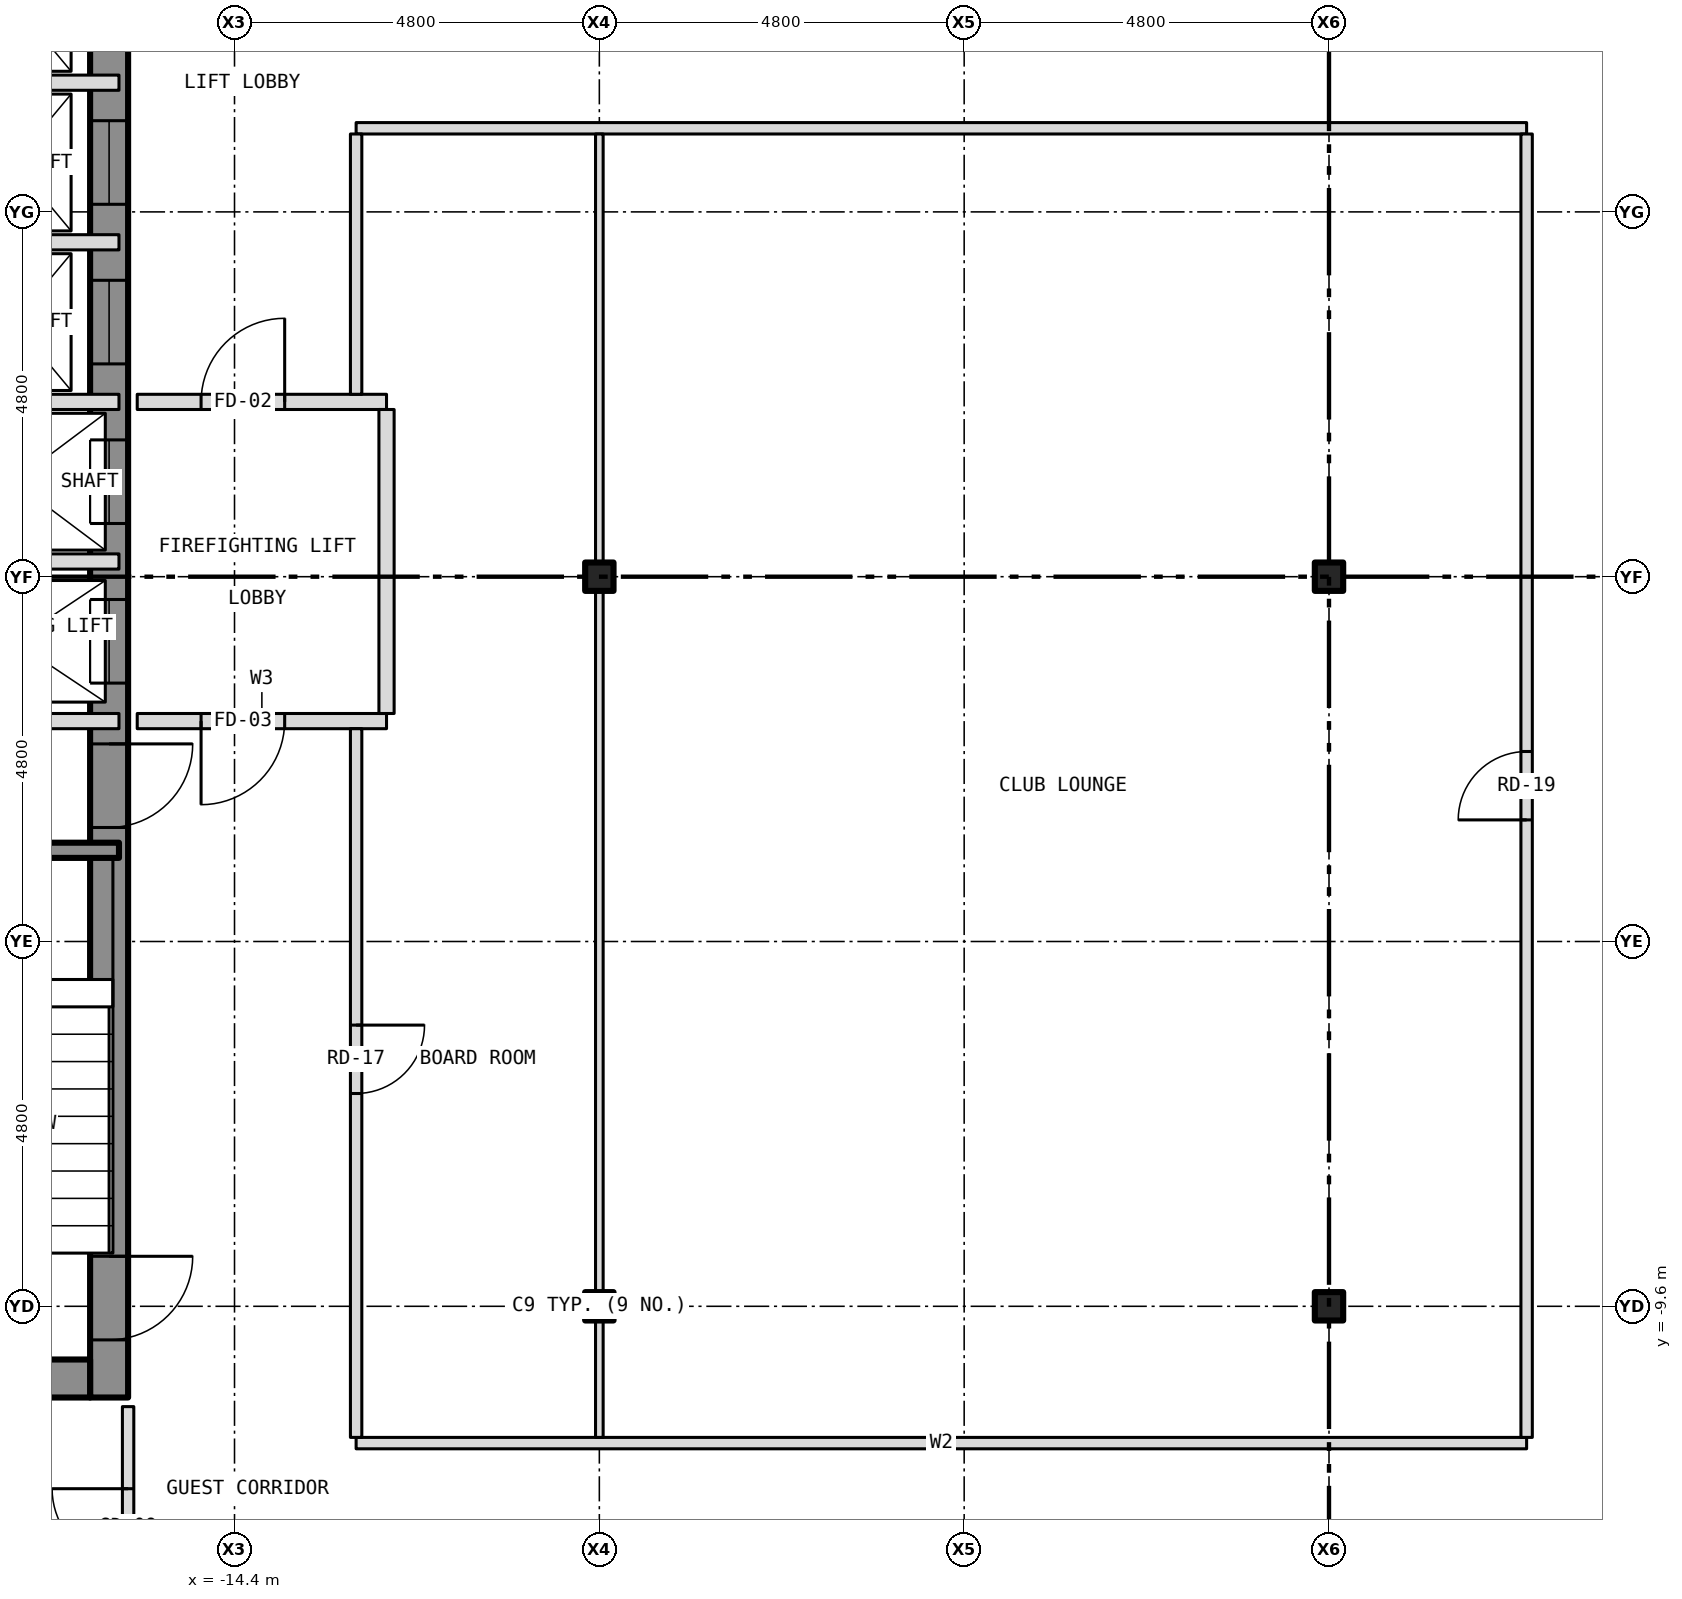
"""IFC4 building model, lengths in metres.
Left out: names, types, materials, properties, quantities, classifications, styles, units other than length and angle.
Written with IfcOpenShell. Run it as: python <this file> out.ifc"""

import sys

from ifc_helpers import new_model, si_unit, direction, frame, frame_2d, origin, origin_2d, place, context, subcontext, project, spatial, rectangle, i_section, extrude, element, fill, save


model = new_model("IFC4")
c1 = context("Model", 3, precision=1e-05, world=origin(), true_north=direction((0.0, 1.0)))
c2 = subcontext(c1, "Body", "Model", "MODEL_VIEW")
j1 = project(units=[si_unit("LENGTHUNIT", "METRE"), si_unit("PLANEANGLEUNIT", "RADIAN")], contexts=[c1])
p1 = place(None, origin())
s1 = spatial("IfcSite", under=j1, at=p1, CompositionType="ELEMENT")
p2 = place(p1, origin())
s2 = spatial("IfcBuilding", under=s1, at=p2, CompositionType="ELEMENT")
p3 = place(p2, frame((0.0, 0.0, 158.5)))
s3 = spatial("IfcBuildingStorey", under=s2, at=p3, CompositionType="ELEMENT", Elevation=158.5)
for number, where, z_axis, x_axis in (
    (1, (-9.6, -9.6, -0.15), (0.0, 0.0, 1.0), (1.0, 0.0, 0.0)),
    (2, (-9.6, 0.0, -0.15), (0.0, 0.0, 1.0), (1.0, 0.0, 0.0)),
    (3, (0.0, -9.6, -0.15), (0.0, 0.0, 1.0), (1.0, 0.0, 0.0)),
    (4, (0.0, 0.0, -0.15), (0.0, 0.0, 1.0), (1.0, 0.0, 0.0)),
):
    element("IfcColumn", number, at=place(p3, frame(where, z_axis=z_axis, x_axis=x_axis)), inside=s3, PredefinedType="COLUMN", context=c2, shape_type="SweptSolid", body=[
        extrude(i_section(OverallWidth=0.373, OverallDepth=0.373, WebThickness=0.016, FlangeThickness=0.026, at=origin_2d()), origin(), (0.0, 0.0, 1.0), 3.5),
    ])
p4 = place(p3, frame((-16.05, -10.8, 0.0), z_axis=(0.0, 0.0, 1.0), x_axis=(0.0, 1.0, 0.0)))
e5 = element("IfcWall", 5, at=p4, inside=s3, PredefinedType="SHEAR", context=c2, shape_type="SweptSolid", body=[
    extrude(rectangle(XDim=21.6, YDim=0.5, at=frame_2d((10.8, 0.0))), origin(), (0.0, 0.0, 1.0), 3.25),
])
p5 = place(p4, frame((9.4, 0.0, 0.0)))
e6 = element("IfcOpeningElement", 6, at=p5, cuts=e5, PredefinedType="OPENING", context=c2, shape_type="SweptSolid", body=[
    extrude(rectangle(XDim=1.1, YDim=2.1, at=frame_2d((0.55, 1.05))), frame((0.0, 0.262, 0.0), z_axis=(0.0, -1.0, 0.0), x_axis=(1.0, 0.0, 0.0)), (0.0, 0.0, 1.0), 0.524),
])
p6 = place(p4, frame((11.5, 0.0, 0.0)))
e7 = element("IfcOpeningElement", 7, at=p6, cuts=e5, PredefinedType="OPENING", context=c2, shape_type="SweptSolid", body=[
    extrude(rectangle(XDim=1.1, YDim=2.1, at=frame_2d((0.55, 1.05))), frame((0.0, 0.262, 0.0), z_axis=(0.0, -1.0, 0.0), x_axis=(1.0, 0.0, 0.0)), (0.0, 0.0, 1.0), 0.524),
])
p7 = place(p4, frame((13.6, 0.0, 0.0)))
e8 = element("IfcOpeningElement", 8, at=p7, cuts=e5, PredefinedType="OPENING", context=c2, shape_type="SweptSolid", body=[
    extrude(rectangle(XDim=1.1, YDim=2.1, at=frame_2d((0.55, 1.05))), frame((0.0, 0.262, 0.0), z_axis=(0.0, -1.0, 0.0), x_axis=(1.0, 0.0, 0.0)), (0.0, 0.0, 1.0), 0.524),
])
p8 = place(p4, frame((15.7, 0.0, 0.0)))
e9 = element("IfcOpeningElement", 9, at=p8, cuts=e5, PredefinedType="OPENING", context=c2, shape_type="SweptSolid", body=[
    extrude(rectangle(XDim=1.1, YDim=2.1, at=frame_2d((0.55, 1.05))), frame((0.0, 0.262, 0.0), z_axis=(0.0, -1.0, 0.0), x_axis=(1.0, 0.0, 0.0)), (0.0, 0.0, 1.0), 0.524),
])
p9 = place(p4, frame((17.8, 0.0, 0.0)))
e10 = element("IfcOpeningElement", 10, at=p9, cuts=e5, PredefinedType="OPENING", context=c2, shape_type="SweptSolid", body=[
    extrude(rectangle(XDim=1.1, YDim=2.1, at=frame_2d((0.55, 1.05))), frame((0.0, 0.262, 0.0), z_axis=(0.0, -1.0, 0.0), x_axis=(1.0, 0.0, 0.0)), (0.0, 0.0, 1.0), 0.524),
])
p10 = place(p4, frame((0.758, 0.0, 0.0)))
e11 = element("IfcOpeningElement", 11, at=p10, cuts=e5, PredefinedType="OPENING", context=c2, shape_type="SweptSolid", body=[
    extrude(rectangle(XDim=1.1, YDim=2.1, at=frame_2d((0.55, 1.05))), frame((0.0, 0.262, 0.0), z_axis=(0.0, -1.0, 0.0), x_axis=(1.0, 0.0, 0.0)), (0.0, 0.0, 1.0), 0.524),
])
p11 = place(p4, frame((7.5, 0.0, 0.0)))
e12 = element("IfcOpeningElement", 12, at=p11, cuts=e5, PredefinedType="OPENING", context=c2, shape_type="SweptSolid", body=[
    extrude(rectangle(XDim=1.1, YDim=2.1, at=frame_2d((0.55, 1.05))), frame((0.0, 0.262, 0.0), z_axis=(0.0, -1.0, 0.0), x_axis=(1.0, 0.0, 0.0)), (0.0, 0.0, 1.0), 0.524),
])
p12 = place(p4, frame((20.0, 0.0, 0.0)))
e13 = element("IfcOpeningElement", 13, at=p12, cuts=e5, PredefinedType="OPENING", context=c2, shape_type="SweptSolid", body=[
    extrude(rectangle(XDim=0.9, YDim=2.1, at=frame_2d((0.45, 1.05))), frame((0.0, 0.262, 0.0), z_axis=(0.0, -1.0, 0.0), x_axis=(1.0, 0.0, 0.0)), (0.0, 0.0, 1.0), 0.524),
])
p13 = place(p3, frame((-21.1, -10.55, 0.0), z_axis=(0.0, 0.0, 1.0), x_axis=(1.0, 0.0, 0.0)))
e14 = element("IfcWall", 14, at=p13, inside=s3, PredefinedType="SHEAR", context=c2, shape_type="SweptSolid", body=[
    extrude(rectangle(XDim=4.8, YDim=0.5, at=frame_2d((2.4, 0.0))), origin(), (0.0, 0.0, 1.0), 3.25),
])
p14 = place(p3, frame((-12.8, -11.4, 0.0), z_axis=(0.0, 0.0, 1.0), x_axis=(1.0, 0.0, 0.0)))
e15 = element("IfcWall", 15, at=p14, inside=s3, PredefinedType="PARTITIONING", context=c2, shape_type="SweptSolid", body=[
    extrude(rectangle(XDim=15.4, YDim=0.15, at=frame_2d((7.7, 0.0))), origin(), (0.0, 0.0, 1.0), 3.35),
])
p15 = place(p3, frame((-20.0, -3.6, 0.0), z_axis=(0.0, 0.0, 1.0), x_axis=(1.0, 0.0, 0.0)))
e16 = element("IfcWall", 16, at=p15, inside=s3, PredefinedType="SHEAR", context=c2, shape_type="SweptSolid", body=[
    extrude(rectangle(XDim=4.08, YDim=0.2, at=frame_2d((2.04, 0.0))), origin(), (0.0, 0.0, 1.0), 3.25),
])
p16 = place(p3, frame((-21.48, -1.9, 0.0), z_axis=(0.0, 0.0, 1.0), x_axis=(1.0, 0.0, 0.0)))
e17 = element("IfcWall", 17, at=p16, inside=s3, PredefinedType="PARTITIONING", context=c2, shape_type="SweptSolid", body=[
    extrude(rectangle(XDim=5.56, YDim=0.2, at=frame_2d((2.78, 0.0))), origin(), (0.0, 0.0, 1.0), 3.25),
])
p17 = place(p16, frame((0.83, 0.0, 0.0)))
e18 = element("IfcOpeningElement", 18, at=p17, cuts=e17, PredefinedType="OPENING", context=c2, shape_type="SweptSolid", body=[
    extrude(rectangle(XDim=0.9, YDim=2.1, at=frame_2d((0.45, 1.05))), frame((0.0, 0.112, 0.0), z_axis=(0.0, -1.0, 0.0), x_axis=(1.0, 0.0, 0.0)), (0.0, 0.0, 1.0), 0.224),
])
p18 = place(p3, frame((-15.68, -1.9, 0.0), z_axis=(0.0, 0.0, 1.0), x_axis=(1.0, 0.0, 0.0)))
e19 = element("IfcWall", 19, at=p18, inside=s3, PredefinedType="PARTITIONING", context=c2, shape_type="SweptSolid", body=[
    extrude(rectangle(XDim=3.28, YDim=0.2, at=frame_2d((1.64, 0.0))), origin(), (0.0, 0.0, 1.0), 3.35),
])
p19 = place(p18, frame((0.84, 0.0, 0.0)))
e20 = element("IfcOpeningElement", 20, at=p19, cuts=e19, PredefinedType="OPENING", context=c2, shape_type="SweptSolid", body=[
    extrude(rectangle(XDim=1.1, YDim=2.1, at=frame_2d((0.55, 1.05))), frame((0.0, 0.112, 0.0), z_axis=(0.0, -1.0, 0.0), x_axis=(1.0, 0.0, 0.0)), (0.0, 0.0, 1.0), 0.224),
])
for number, where, z_axis, x_axis in (
    (21, (-18.8, 0.2, 0.0), (0.0, 0.0, 1.0), (1.0, 0.0, 0.0)),
    (22, (-18.8, 2.3, 0.0), (0.0, 0.0, 1.0), (1.0, 0.0, 0.0)),
):
    element("IfcWall", number, at=place(p3, frame(where, z_axis=z_axis, x_axis=x_axis)), inside=s3, PredefinedType="PARTITIONING", context=c2, shape_type="SweptSolid", body=[
        extrude(rectangle(XDim=2.88, YDim=0.2, at=frame_2d((1.44, 0.0))), origin(), (0.0, 0.0, 1.0), 3.25),
    ])
p20 = place(p3, frame((-15.68, 2.3, 0.0), z_axis=(0.0, 0.0, 1.0), x_axis=(1.0, 0.0, 0.0)))
e23 = element("IfcWall", 23, at=p20, inside=s3, PredefinedType="PARTITIONING", context=c2, shape_type="SweptSolid", body=[
    extrude(rectangle(XDim=3.28, YDim=0.2, at=frame_2d((1.64, 0.0))), origin(), (0.0, 0.0, 1.0), 3.35),
])
p21 = place(p20, frame((0.84, 0.0, 0.0)))
e24 = element("IfcOpeningElement", 24, at=p21, cuts=e23, PredefinedType="OPENING", context=c2, shape_type="SweptSolid", body=[
    extrude(rectangle(XDim=1.1, YDim=2.1, at=frame_2d((0.55, 1.05))), frame((0.0, 0.112, 0.0), z_axis=(0.0, -1.0, 0.0), x_axis=(1.0, 0.0, 0.0)), (0.0, 0.0, 1.0), 0.224),
])
p22 = place(p3, frame((-18.8, 4.4, 0.0), z_axis=(0.0, 0.0, 1.0), x_axis=(1.0, 0.0, 0.0)))
e25 = element("IfcWall", 25, at=p22, inside=s3, PredefinedType="PARTITIONING", context=c2, shape_type="SweptSolid", body=[
    extrude(rectangle(XDim=2.88, YDim=0.2, at=frame_2d((1.44, 0.0))), origin(), (0.0, 0.0, 1.0), 3.25),
])
p23 = place(p3, frame((-12.8, 5.9, 0.0), z_axis=(0.0, 0.0, 1.0), x_axis=(1.0, 0.0, 0.0)))
e26 = element("IfcWall", 26, at=p23, inside=s3, PredefinedType="PARTITIONING", context=c2, shape_type="SweptSolid", body=[
    extrude(rectangle(XDim=15.4, YDim=0.15, at=frame_2d((7.7, 0.0))), origin(), (0.0, 0.0, 1.0), 3.35),
])
p24 = place(p3, frame((-18.8, 6.5, 0.0), z_axis=(0.0, 0.0, 1.0), x_axis=(1.0, 0.0, 0.0)))
e27 = element("IfcWall", 27, at=p24, inside=s3, PredefinedType="PARTITIONING", context=c2, shape_type="SweptSolid", body=[
    extrude(rectangle(XDim=2.88, YDim=0.2, at=frame_2d((1.44, 0.0))), origin(), (0.0, 0.0, 1.0), 3.25),
])
p25 = place(p3, frame((-15.8, -13.525, 0.0), z_axis=(0.0, 0.0, 1.0), x_axis=(0.0, 1.0, 0.0)))
e28 = element("IfcWall", 28, at=p25, inside=s3, PredefinedType="PARTITIONING", context=c2, shape_type="SweptSolid", body=[
    extrude(rectangle(XDim=2.605, YDim=0.15, at=frame_2d((1.302, 0.0))), origin(), (0.0, 0.0, 1.0), 3.35),
])
p26 = place(p25, frame((0.525, 0.0, 0.0)))
e29 = element("IfcOpeningElement", 29, at=p26, cuts=e28, PredefinedType="OPENING", context=c2, shape_type="SweptSolid", body=[
    extrude(rectangle(XDim=1.0, YDim=2.1, at=frame_2d((0.5, 1.05))), frame((0.0, 0.087, 0.0), z_axis=(0.0, -1.0, 0.0), x_axis=(1.0, 0.0, 0.0)), (0.0, 0.0, 1.0), 0.174),
])
p27 = place(p3, frame((-12.8, -11.325, 0.0), z_axis=(0.0, 0.0, 1.0), x_axis=(0.0, 1.0, 0.0)))
e30 = element("IfcWall", 30, at=p27, inside=s3, PredefinedType="PARTITIONING", context=c2, shape_type="SweptSolid", body=[
    extrude(rectangle(XDim=9.325, YDim=0.15, at=frame_2d((4.663, 0.0))), origin(), (0.0, 0.0, 1.0), 3.35),
])
p28 = place(p27, frame((4.525, 0.0, 0.0)))
e31 = element("IfcOpeningElement", 31, at=p28, cuts=e30, PredefinedType="OPENING", context=c2, shape_type="SweptSolid", body=[
    extrude(rectangle(XDim=0.9, YDim=2.1, at=frame_2d((0.45, 1.05))), frame((0.0, 0.087, 0.0), z_axis=(0.0, -1.0, 0.0), x_axis=(1.0, 0.0, 0.0)), (0.0, 0.0, 1.0), 0.174),
])
p29 = place(p3, frame((-12.8, 2.4, 0.0), z_axis=(0.0, 0.0, 1.0), x_axis=(0.0, 1.0, 0.0)))
e32 = element("IfcWall", 32, at=p29, inside=s3, PredefinedType="PARTITIONING", context=c2, shape_type="SweptSolid", body=[
    extrude(rectangle(XDim=3.425, YDim=0.15, at=frame_2d((1.712, 0.0))), origin(), (0.0, 0.0, 1.0), 3.35),
])
p30 = place(p3, frame((-12.4, -1.8, 0.0), z_axis=(0.0, 0.0, 1.0), x_axis=(0.0, 1.0, 0.0)))
e33 = element("IfcWall", 33, at=p30, inside=s3, PredefinedType="PARTITIONING", context=c2, shape_type="SweptSolid", body=[
    extrude(rectangle(XDim=4.0, YDim=0.2, at=frame_2d((2.0, 0.0))), origin(), (0.0, 0.0, 1.0), 3.35),
])
p31 = place(p3, frame((-9.6, -11.325, 0.0), z_axis=(0.0, 0.0, 1.0), x_axis=(0.0, 1.0, 0.0)))
e34 = element("IfcWall", 34, at=p31, inside=s3, PredefinedType="PARTITIONING", context=c2, shape_type="SweptSolid", body=[
    extrude(rectangle(XDim=1.538, YDim=0.1, at=frame_2d((0.769, 0.0))), origin(), (0.0, 0.0, 1.0), 2.728),
])
p32 = place(p3, frame((-9.6, -9.787, 0.0), z_axis=(0.0, 0.0, 1.0), x_axis=(0.0, 1.0, 0.0)))
e35 = element("IfcWall", 35, at=p32, inside=s3, PredefinedType="PARTITIONING", context=c2, shape_type="SweptSolid", body=[
    extrude(rectangle(XDim=0.374, YDim=0.1, at=frame_2d((0.187, 0.0))), origin(), (0.0, 0.0, 1.0), 3.35),
])
p33 = place(p3, frame((-9.6, -9.413, 0.0), z_axis=(0.0, 0.0, 1.0), x_axis=(0.0, 1.0, 0.0)))
e36 = element("IfcWall", 36, at=p33, inside=s3, PredefinedType="PARTITIONING", context=c2, shape_type="SweptSolid", body=[
    extrude(rectangle(XDim=9.226, YDim=0.1, at=frame_2d((4.613, 0.0))), origin(), (0.0, 0.0, 1.0), 2.728),
])
p34 = place(p3, frame((-9.6, -0.187, 0.0), z_axis=(0.0, 0.0, 1.0), x_axis=(0.0, 1.0, 0.0)))
e37 = element("IfcWall", 37, at=p34, inside=s3, PredefinedType="PARTITIONING", context=c2, shape_type="SweptSolid", body=[
    extrude(rectangle(XDim=0.374, YDim=0.1, at=frame_2d((0.187, 0.0))), origin(), (0.0, 0.0, 1.0), 3.35),
])
p35 = place(p3, frame((-9.6, 0.187, 0.0), z_axis=(0.0, 0.0, 1.0), x_axis=(0.0, 1.0, 0.0)))
e38 = element("IfcWall", 38, at=p35, inside=s3, PredefinedType="PARTITIONING", context=c2, shape_type="SweptSolid", body=[
    extrude(rectangle(XDim=5.638, YDim=0.1, at=frame_2d((2.819, 0.0))), origin(), (0.0, 0.0, 1.0), 2.728),
])
p36 = place(p3, frame((2.6, -11.325, 0.0), z_axis=(0.0, 0.0, 1.0), x_axis=(0.0, 1.0, 0.0)))
e39 = element("IfcWall", 39, at=p36, inside=s3, PredefinedType="PARTITIONING", context=c2, shape_type="SweptSolid", body=[
    extrude(rectangle(XDim=17.15, YDim=0.15, at=frame_2d((8.575, 0.0))), origin(), (0.0, 0.0, 1.0), 3.35),
])
p37 = place(p36, frame((8.125, 0.0, 0.0)))
e40 = element("IfcOpeningElement", 40, at=p37, cuts=e39, PredefinedType="OPENING", context=c2, shape_type="SweptSolid", body=[
    extrude(rectangle(XDim=0.9, YDim=2.1, at=frame_2d((0.45, 1.05))), frame((0.0, 0.087, 0.0), z_axis=(0.0, -1.0, 0.0), x_axis=(1.0, 0.0, 0.0)), (0.0, 0.0, 1.0), 0.174),
])
p38 = place(p5, origin())
e41 = element("IfcDoor", 41, at=p38, inside=s3, OperationType="SLIDING_TO_LEFT", PredefinedType="DOOR", context=c2, shape_type="SweptSolid", body=[
    extrude(rectangle(XDim=1.1, YDim=2.1, at=frame_2d((0.55, 1.05))), frame((0.0, 0.025, 0.0), z_axis=(0.0, -1.0, 0.0), x_axis=(1.0, 0.0, 0.0)), (0.0, 0.0, 1.0), 0.05),
])
fill(e6, e41)
p39 = place(p6, origin())
e42 = element("IfcDoor", 42, at=p39, inside=s3, OperationType="SLIDING_TO_LEFT", PredefinedType="DOOR", context=c2, shape_type="SweptSolid", body=[
    extrude(rectangle(XDim=1.1, YDim=2.1, at=frame_2d((0.55, 1.05))), frame((0.0, 0.025, 0.0), z_axis=(0.0, -1.0, 0.0), x_axis=(1.0, 0.0, 0.0)), (0.0, 0.0, 1.0), 0.05),
])
fill(e7, e42)
p40 = place(p7, origin())
e43 = element("IfcDoor", 43, at=p40, inside=s3, OperationType="SLIDING_TO_LEFT", PredefinedType="DOOR", context=c2, shape_type="SweptSolid", body=[
    extrude(rectangle(XDim=1.1, YDim=2.1, at=frame_2d((0.55, 1.05))), frame((0.0, 0.025, 0.0), z_axis=(0.0, -1.0, 0.0), x_axis=(1.0, 0.0, 0.0)), (0.0, 0.0, 1.0), 0.05),
])
fill(e8, e43)
p41 = place(p8, origin())
e44 = element("IfcDoor", 44, at=p41, inside=s3, OperationType="SLIDING_TO_LEFT", PredefinedType="DOOR", context=c2, shape_type="SweptSolid", body=[
    extrude(rectangle(XDim=1.1, YDim=2.1, at=frame_2d((0.55, 1.05))), frame((0.0, 0.025, 0.0), z_axis=(0.0, -1.0, 0.0), x_axis=(1.0, 0.0, 0.0)), (0.0, 0.0, 1.0), 0.05),
])
fill(e9, e44)
p42 = place(p10, origin())
e45 = element("IfcDoor", 45, at=p42, inside=s3, OperationType="SINGLE_SWING_RIGHT", PredefinedType="DOOR", context=c2, shape_type="SweptSolid", body=[
    extrude(rectangle(XDim=1.1, YDim=2.1, at=frame_2d((0.55, 1.05))), frame((0.0, 0.025, 0.0), z_axis=(0.0, -1.0, 0.0), x_axis=(1.0, 0.0, 0.0)), (0.0, 0.0, 1.0), 0.05),
])
fill(e11, e45)
p43 = place(p11, origin())
e46 = element("IfcDoor", 46, at=p43, inside=s3, OperationType="SINGLE_SWING_RIGHT", PredefinedType="DOOR", context=c2, shape_type="SweptSolid", body=[
    extrude(rectangle(XDim=1.1, YDim=2.1, at=frame_2d((0.55, 1.05))), frame((0.0, 0.025, 0.0), z_axis=(0.0, -1.0, 0.0), x_axis=(1.0, 0.0, 0.0)), (0.0, 0.0, 1.0), 0.05),
])
fill(e12, e46)
p44 = place(p21, origin())
e47 = element("IfcDoor", 47, at=p44, inside=s3, OperationType="SINGLE_SWING_RIGHT", PredefinedType="DOOR", context=c2, shape_type="SweptSolid", body=[
    extrude(rectangle(XDim=1.1, YDim=2.1, at=frame_2d((0.55, 1.05))), frame((0.0, 0.025, 0.0), z_axis=(0.0, -1.0, 0.0), x_axis=(1.0, 0.0, 0.0)), (0.0, 0.0, 1.0), 0.05),
])
fill(e24, e47)
p45 = place(p19, origin())
e48 = element("IfcDoor", 48, at=p45, inside=s3, OperationType="SINGLE_SWING_LEFT", PredefinedType="DOOR", context=c2, shape_type="SweptSolid", body=[
    extrude(rectangle(XDim=1.1, YDim=2.1, at=frame_2d((0.55, 1.05))), frame((0.0, 0.025, 0.0), z_axis=(0.0, -1.0, 0.0), x_axis=(1.0, 0.0, 0.0)), (0.0, 0.0, 1.0), 0.05),
])
fill(e20, e48)
p46 = place(p26, origin())
e49 = element("IfcDoor", 49, at=p46, inside=s3, OperationType="SINGLE_SWING_RIGHT", PredefinedType="DOOR", context=c2, shape_type="SweptSolid", body=[
    extrude(rectangle(XDim=1.0, YDim=2.1, at=frame_2d((0.5, 1.05))), frame((0.0, 0.025, 0.0), z_axis=(0.0, -1.0, 0.0), x_axis=(1.0, 0.0, 0.0)), (0.0, 0.0, 1.0), 0.05),
])
fill(e29, e49)
p47 = place(p28, origin())
e50 = element("IfcDoor", 50, at=p47, inside=s3, OperationType="SINGLE_SWING_RIGHT", PredefinedType="DOOR", context=c2, shape_type="SweptSolid", body=[
    extrude(rectangle(XDim=0.9, YDim=2.1, at=frame_2d((0.45, 1.05))), frame((0.0, 0.025, 0.0), z_axis=(0.0, -1.0, 0.0), x_axis=(1.0, 0.0, 0.0)), (0.0, 0.0, 1.0), 0.05),
])
fill(e31, e50)
p48 = place(p37, origin())
e51 = element("IfcDoor", 51, at=p48, inside=s3, OperationType="SINGLE_SWING_LEFT", PredefinedType="DOOR", context=c2, shape_type="SweptSolid", body=[
    extrude(rectangle(XDim=0.9, YDim=2.1, at=frame_2d((0.45, 1.05))), frame((0.0, 0.025, 0.0), z_axis=(0.0, -1.0, 0.0), x_axis=(1.0, 0.0, 0.0)), (0.0, 0.0, 1.0), 0.05),
])
fill(e40, e51)
save(model, sys.argv[1])
